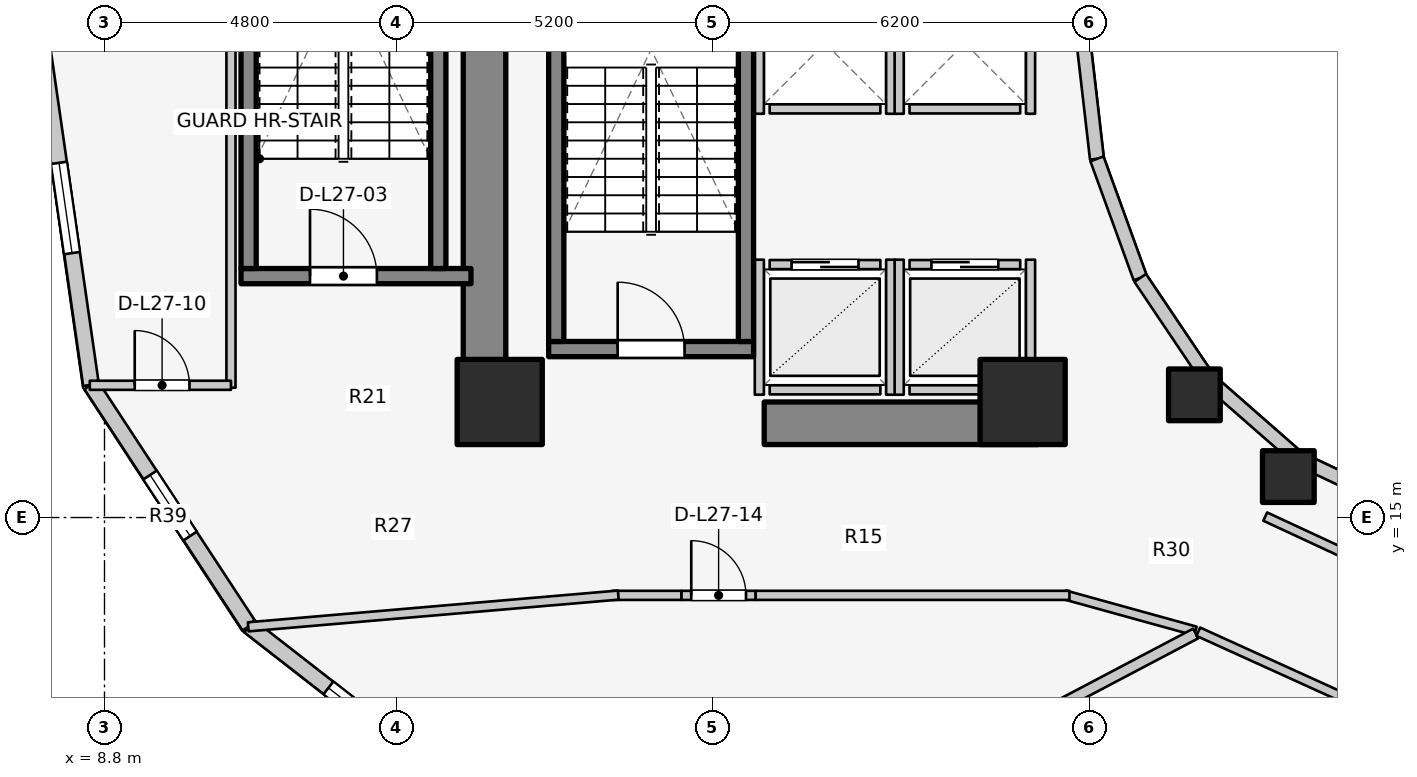
"""IFC4 building model, lengths in metres.
Left out: names, types, materials, properties, quantities, classifications, styles, units other than length and angle.
Written with IfcOpenShell. Run it as: python <this file> out.ifc"""

import sys

from ifc_helpers import new_model, si_unit, direction, frame, frame_2d, origin, origin_2d, place, context, subcontext, project, spatial, rectangle, extrude, element, fill, save


model = new_model("IFC4")
c1 = context("Model", 3, precision=1e-05, world=origin(), true_north=direction((0.0, 1.0)))
c2 = subcontext(c1, "Body", "Model", "MODEL_VIEW")
j1 = project(units=[si_unit("LENGTHUNIT", "METRE"), si_unit("PLANEANGLEUNIT", "RADIAN")], contexts=[c1])
p1 = place(None, origin())
s1 = spatial("IfcSite", under=j1, at=p1, CompositionType="ELEMENT")
p2 = place(p1, origin())
s2 = spatial("IfcBuilding", under=s1, at=p2, CompositionType="ELEMENT")
p3 = place(p2, frame((0.0, 0.0, 91.8)))
s3 = spatial("IfcBuildingStorey", under=s2, at=p3, CompositionType="ELEMENT", Elevation=91.8)
p4 = place(p3, frame((15.05, 17.05, 0.0), z_axis=(0.0, 0.0, 1.0), x_axis=(0.0, 1.0, 0.0)))
e1 = element("IfcWall", 1, at=p4, inside=s3, PredefinedType="SHEAR", context=c2, shape_type="SweptSolid", body=[
    extrude(rectangle(XDim=12.8, YDim=0.7, at=frame_2d((6.4, 0.0))), origin(), (0.0, 0.0, 1.0), 3.1),
])
p5 = place(p3, frame((19.65, 16.55, 0.0), z_axis=(0.0, 0.0, 1.0), x_axis=(1.0, 0.0, 0.0)))
e2 = element("IfcWall", 2, at=p5, inside=s3, PredefinedType="SHEAR", context=c2, shape_type="SweptSolid", body=[
    extrude(rectangle(XDim=4.5, YDim=0.7, at=frame_2d((2.25, 0.0))), origin(), (0.0, 0.0, 1.0), 3.1),
])
p6 = place(p3, frame((16.105, 17.77, 0.0), z_axis=(0.0, 0.0, 1.0), x_axis=(1.0, 0.0, 0.0)))
e3 = element("IfcWall", 3, at=p6, inside=s3, PredefinedType="SOLIDWALL", context=c2, shape_type="SweptSolid", body=[
    extrude(rectangle(XDim=3.37, YDim=0.25, at=frame_2d((1.685, 0.0))), origin(), (0.0, 0.0, 1.0), 3.1),
])
p7 = place(p6, frame((1.135, 0.0, 0.0)))
e4 = element("IfcOpeningElement", 4, at=p7, cuts=e3, PredefinedType="OPENING", context=c2, shape_type="SweptSolid", body=[
    extrude(rectangle(XDim=1.1, YDim=2.1, at=frame_2d((0.55, 1.05))), frame((0.0, 0.135, 0.0), z_axis=(0.0, -1.0, 0.0), x_axis=(1.0, 0.0, 0.0)), (0.0, 0.0, 1.0), 0.27),
])
for number, where, z_axis, x_axis in (
    (5, (16.23, 17.895, 0.0), (0.0, 0.0, 1.0), (0.0, 1.0, 0.0)),
    (6, (19.35, 17.895, 0.0), (0.0, 0.0, 1.0), (0.0, 1.0, 0.0)),
):
    element("IfcWall", number, at=place(p3, frame(where, z_axis=z_axis, x_axis=x_axis)), inside=s3, PredefinedType="SOLIDWALL", context=c2, shape_type="SweptSolid", body=[
        extrude(rectangle(XDim=7.81, YDim=0.25, at=frame_2d((3.905, 0.0))), origin(), (0.0, 0.0, 1.0), 3.1),
    ])
p8 = place(p3, frame((11.045, 18.97, 0.0), z_axis=(0.0, 0.0, 1.0), x_axis=(1.0, 0.0, 0.0)))
e7 = element("IfcWall", 7, at=p8, inside=s3, PredefinedType="SOLIDWALL", context=c2, shape_type="SweptSolid", body=[
    extrude(rectangle(XDim=3.782, YDim=0.25, at=frame_2d((1.891, 0.0))), origin(), (0.0, 0.0, 1.0), 3.1),
])
p9 = place(p8, frame((1.135, 0.0, 0.0)))
e8 = element("IfcOpeningElement", 8, at=p9, cuts=e7, PredefinedType="OPENING", context=c2, shape_type="SweptSolid", body=[
    extrude(rectangle(XDim=1.1, YDim=2.1, at=frame_2d((0.55, 1.05))), frame((0.0, 0.135, 0.0), z_axis=(0.0, -1.0, 0.0), x_axis=(1.0, 0.0, 0.0)), (0.0, 0.0, 1.0), 0.27),
])
for number, where, z_axis, x_axis in (
    (9, (11.17, 19.095, 0.0), (0.0, 0.0, 1.0), (0.0, 1.0, 0.0)),
    (10, (14.29, 19.095, 0.0), (0.0, 0.0, 1.0), (0.0, 1.0, 0.0)),
):
    element("IfcWall", number, at=place(p3, frame(where, z_axis=z_axis, x_axis=x_axis)), inside=s3, PredefinedType="SOLIDWALL", context=c2, shape_type="SweptSolid", body=[
        extrude(rectangle(XDim=7.81, YDim=0.25, at=frame_2d((3.905, 0.0))), origin(), (0.0, 0.0, 1.0), 3.1),
    ])
for number, where, z_axis, x_axis in (
    (11, (15.3, 16.9, 0.0), (0.0, 0.0, 1.0), (1.0, 0.0, 0.0)),
    (12, (23.9, 16.9, 0.0), (0.0, 0.0, 1.0), (1.0, 0.0, 0.0)),
):
    element("IfcColumn", number, at=place(p3, frame(where, z_axis=z_axis, x_axis=x_axis)), inside=s3, PredefinedType="COLUMN", context=c2, shape_type="SweptSolid", body=[
        extrude(rectangle(XDim=1.4, YDim=1.4, at=origin_2d()), origin(), (0.0, 0.0, 1.0), 3.1),
    ])
for number, where, z_axis, x_axis in (
    (13, (26.725, 17.018, 0.0), (0.0, 0.0, 1.0), (1.0, 0.0, 0.0)),
    (14, (28.27, 15.673, 0.0), (0.0, 0.0, 1.0), (1.0, 0.0, 0.0)),
):
    element("IfcColumn", number, at=place(p3, frame(where, z_axis=z_axis, x_axis=x_axis)), inside=s3, PredefinedType="COLUMN", context=c2, shape_type="SweptSolid", body=[
        extrude(rectangle(XDim=0.85, YDim=0.85, at=origin_2d()), origin(), (0.0, 0.0, 1.0), 3.1),
    ])
p10 = place(p3, frame((24.88, 23.0, 0.0), z_axis=(0.0, 0.0, 1.0), x_axis=(0.114711713601, -0.993398823617, 0.0)))
e15 = element("IfcWall", 15, at=p10, inside=s3, PredefinedType="STANDARD", context=c2, shape_type="SweptSolid", body=[
    extrude(rectangle(XDim=2.115, YDim=0.23, at=frame_2d((1.058, 0.0))), origin(), (0.0, 0.0, 1.0), 2.56),
])
p11 = place(p3, frame((25.123, 20.898, 0.0), z_axis=(0.0, 0.0, 1.0), x_axis=(0.341423187295, -0.93990968033, 0.0)))
e16 = element("IfcWall", 16, at=p11, inside=s3, PredefinedType="STANDARD", context=c2, shape_type="SweptSolid", body=[
    extrude(rectangle(XDim=2.084, YDim=0.23, at=frame_2d((1.042, 0.0))), origin(), (0.0, 0.0, 1.0), 2.56),
])
p12 = place(p3, frame((25.834, 18.94, 0.0), z_axis=(0.0, 0.0, 1.0), x_axis=(0.558197800898, -0.829707909492, 0.0)))
e17 = element("IfcWall", 17, at=p12, inside=s3, PredefinedType="STANDARD", context=c2, shape_type="SweptSolid", body=[
    extrude(rectangle(XDim=2.027, YDim=0.23, at=frame_2d((1.013, 0.0))), origin(), (0.0, 0.0, 1.0), 1.22),
])
p13 = place(p3, frame((26.965, 17.258, 0.0), z_axis=(0.0, 0.0, 1.0), x_axis=(0.752576694707, -0.658504607869, 0.0)))
e18 = element("IfcWall", 18, at=p13, inside=s3, PredefinedType="STANDARD", context=c2, shape_type="SweptSolid", body=[
    extrude(rectangle(XDim=1.959, YDim=0.23, at=frame_2d((0.98, 0.0))), origin(), (0.0, 0.0, 1.0), 1.22),
])
p14 = place(p3, frame((28.44, 15.968, 0.0), z_axis=(0.0, 0.0, 1.0), x_axis=(0.904179699603, -0.427152280606, 0.0)))
e19 = element("IfcWall", 19, at=p14, inside=s3, PredefinedType="STANDARD", context=c2, shape_type="SweptSolid", body=[
    extrude(rectangle(XDim=1.899, YDim=0.23, at=frame_2d((0.95, 0.0))), origin(), (0.0, 0.0, 1.0), 1.22),
])
p15 = place(p3, frame((7.74, 23.0, 0.0), z_axis=(0.0, 0.0, 1.0), x_axis=(0.142572472068, -0.98978436551, 0.0)))
e20 = element("IfcWall", 20, at=p15, inside=s3, PredefinedType="STANDARD", context=c2, shape_type="SweptSolid", body=[
    extrude(rectangle(XDim=5.879, YDim=0.26, at=frame_2d((2.939, 0.0))), origin(), (0.0, 0.0, 1.0), 2.57),
])
p16 = place(p15, frame((2.189, 0.0, 0.75)))
e21 = element("IfcOpeningElement", 21, at=p16, cuts=e20, PredefinedType="OPENING", context=c2, shape_type="SweptSolid", body=[
    extrude(rectangle(XDim=1.5, YDim=1.6, at=frame_2d((0.75, 0.8))), frame((0.0, 0.14, 0.0), z_axis=(0.0, -1.0, 0.0), x_axis=(1.0, 0.0, 0.0)), (0.0, 0.0, 1.0), 0.28),
])
p17 = place(p3, frame((8.578, 17.181, 0.0), z_axis=(0.0, 0.0, 1.0), x_axis=(0.548283220945, -0.836292717672, 0.0)))
e22 = element("IfcWall", 22, at=p17, inside=s3, PredefinedType="STANDARD", context=c2, shape_type="SweptSolid", body=[
    extrude(rectangle(XDim=4.744, YDim=0.26, at=frame_2d((2.372, 0.0))), origin(), (0.0, 0.0, 1.0), 1.22),
])
p18 = place(p17, frame((1.772, 0.0, 0.15)))
e23 = element("IfcOpeningElement", 23, at=p18, cuts=e22, PredefinedType="OPENING", context=c2, shape_type="SweptSolid", body=[
    extrude(rectangle(XDim=1.2, YDim=0.9, at=frame_2d((0.6, 0.45))), frame((0.0, 0.14, 0.0), z_axis=(0.0, -1.0, 0.0), x_axis=(1.0, 0.0, 0.0)), (0.0, 0.0, 1.0), 0.28),
])
p19 = place(p3, frame((11.179, 13.214, 0.0), z_axis=(0.0, 0.0, 1.0), x_axis=(0.789127449954, -0.614229491094, 0.0)))
e24 = element("IfcWall", 24, at=p19, inside=s3, PredefinedType="STANDARD", context=c2, shape_type="SweptSolid", body=[
    extrude(rectangle(XDim=4.505, YDim=0.26, at=frame_2d((2.252, 0.0))), origin(), (0.0, 0.0, 1.0), 1.22),
])
p20 = place(p19, frame((1.652, 0.0, 0.15)))
e25 = element("IfcOpeningElement", 25, at=p20, cuts=e24, PredefinedType="OPENING", context=c2, shape_type="SweptSolid", body=[
    extrude(rectangle(XDim=1.2, YDim=0.9, at=frame_2d((0.6, 0.45))), frame((0.0, 0.14, 0.0), z_axis=(0.0, -1.0, 0.0), x_axis=(1.0, 0.0, 0.0)), (0.0, 0.0, 1.0), 0.28),
])
p21 = place(p3, frame((19.74, 19.16, 0.0), z_axis=(0.0, 0.0, 1.0), x_axis=(1.0, 0.0, 0.0)))
e26 = element("IfcWall", 26, at=p21, inside=s3, PredefinedType="SOLIDWALL", context=c2, shape_type="SweptSolid", body=[
    extrude(rectangle(XDim=1.82, YDim=0.15, at=frame_2d((0.91, 0.0))), origin(), (0.0, 0.0, 1.0), 2.575),
])
p22 = place(p21, frame((0.36, 0.0, 0.0)))
e27 = element("IfcOpeningElement", 27, at=p22, cuts=e26, PredefinedType="OPENING", context=c2, shape_type="SweptSolid", body=[
    extrude(rectangle(XDim=1.1, YDim=2.1, at=frame_2d((0.55, 1.05))), frame((0.0, 0.085, 0.0), z_axis=(0.0, -1.0, 0.0), x_axis=(1.0, 0.0, 0.0)), (0.0, 0.0, 1.0), 0.17),
])
p23 = place(p3, frame((19.74, 17.1, 0.0), z_axis=(0.0, 0.0, 1.0), x_axis=(1.0, 0.0, 0.0)))
e28 = element("IfcWall", 28, at=p23, inside=s3, PredefinedType="SOLIDWALL", context=c2, shape_type="SweptSolid", body=[
    extrude(rectangle(XDim=1.82, YDim=0.15, at=frame_2d((0.91, 0.0))), origin(), (0.0, 0.0, 1.0), 2.575),
])
p24 = place(p3, frame((19.57, 17.02, 0.0), z_axis=(0.0, 0.0, 1.0), x_axis=(0.0, 1.0, 0.0)))
e29 = element("IfcWall", 29, at=p24, inside=s3, PredefinedType="SOLIDWALL", context=c2, shape_type="SweptSolid", body=[
    extrude(rectangle(XDim=2.22, YDim=0.15, at=frame_2d((1.11, 0.0))), origin(), (0.0, 0.0, 1.0), 2.12),
])
p25 = place(p3, frame((21.73, 17.02, 0.0), z_axis=(0.0, 0.0, 1.0), x_axis=(0.0, 1.0, 0.0)))
e30 = element("IfcWall", 30, at=p25, inside=s3, PredefinedType="SOLIDWALL", context=c2, shape_type="SweptSolid", body=[
    extrude(rectangle(XDim=2.22, YDim=0.15, at=frame_2d((1.11, 0.0))), origin(), (0.0, 0.0, 1.0), 2.575),
])
p26 = place(p3, frame((22.04, 19.16, 0.0), z_axis=(0.0, 0.0, 1.0), x_axis=(1.0, 0.0, 0.0)))
e31 = element("IfcWall", 31, at=p26, inside=s3, PredefinedType="SOLIDWALL", context=c2, shape_type="SweptSolid", body=[
    extrude(rectangle(XDim=1.82, YDim=0.15, at=frame_2d((0.91, 0.0))), origin(), (0.0, 0.0, 1.0), 2.12),
])
p27 = place(p26, frame((0.36, 0.0, 0.0)))
e32 = element("IfcOpeningElement", 32, at=p27, cuts=e31, PredefinedType="OPENING", context=c2, shape_type="SweptSolid", body=[
    extrude(rectangle(XDim=1.1, YDim=2.1, at=frame_2d((0.55, 1.05))), frame((0.0, 0.085, 0.0), z_axis=(0.0, -1.0, 0.0), x_axis=(1.0, 0.0, 0.0)), (0.0, 0.0, 1.0), 0.17),
])
p28 = place(p3, frame((22.04, 17.1, 0.0), z_axis=(0.0, 0.0, 1.0), x_axis=(1.0, 0.0, 0.0)))
e33 = element("IfcWall", 33, at=p28, inside=s3, PredefinedType="SOLIDWALL", context=c2, shape_type="SweptSolid", body=[
    extrude(rectangle(XDim=1.82, YDim=0.15, at=frame_2d((0.91, 0.0))), origin(), (0.0, 0.0, 1.0), 2.12),
])
p29 = place(p3, frame((21.87, 17.02, 0.0), z_axis=(0.0, 0.0, 1.0), x_axis=(0.0, 1.0, 0.0)))
e34 = element("IfcWall", 34, at=p29, inside=s3, PredefinedType="SOLIDWALL", context=c2, shape_type="SweptSolid", body=[
    extrude(rectangle(XDim=2.22, YDim=0.15, at=frame_2d((1.11, 0.0))), origin(), (0.0, 0.0, 1.0), 2.575),
])
p30 = place(p3, frame((24.03, 17.02, 0.0), z_axis=(0.0, 0.0, 1.0), x_axis=(0.0, 1.0, 0.0)))
e35 = element("IfcWall", 35, at=p30, inside=s3, PredefinedType="SOLIDWALL", context=c2, shape_type="SweptSolid", body=[
    extrude(rectangle(XDim=2.22, YDim=0.15, at=frame_2d((1.11, 0.0))), origin(), (0.0, 0.0, 1.0), 1.873),
])
p31 = place(p3, frame((19.74, 21.72, 0.0), z_axis=(0.0, 0.0, 1.0), x_axis=(1.0, 0.0, 0.0)))
e36 = element("IfcWall", 36, at=p31, inside=s3, PredefinedType="SOLIDWALL", context=c2, shape_type="SweptSolid", body=[
    extrude(rectangle(XDim=1.82, YDim=0.15, at=frame_2d((0.91, 0.0))), origin(), (0.0, 0.0, 1.0), 2.575),
])
for number, where, z_axis, x_axis in (
    (37, (19.57, 21.64, 0.0), (0.0, 0.0, 1.0), (0.0, 1.0, 0.0)),
    (38, (21.73, 21.64, 0.0), (0.0, 0.0, 1.0), (0.0, 1.0, 0.0)),
):
    element("IfcWall", number, at=place(p3, frame(where, z_axis=z_axis, x_axis=x_axis)), inside=s3, PredefinedType="SOLIDWALL", context=c2, shape_type="SweptSolid", body=[
        extrude(rectangle(XDim=2.32, YDim=0.15, at=frame_2d((1.16, 0.0))), origin(), (0.0, 0.0, 1.0), 2.575),
    ])
p32 = place(p3, frame((22.04, 21.72, 0.0), z_axis=(0.0, 0.0, 1.0), x_axis=(1.0, 0.0, 0.0)))
e39 = element("IfcWall", 39, at=p32, inside=s3, PredefinedType="SOLIDWALL", context=c2, shape_type="SweptSolid", body=[
    extrude(rectangle(XDim=1.82, YDim=0.15, at=frame_2d((0.91, 0.0))), origin(), (0.0, 0.0, 1.0), 2.12),
])
p33 = place(p3, frame((21.87, 21.64, 0.0), z_axis=(0.0, 0.0, 1.0), x_axis=(0.0, 1.0, 0.0)))
e40 = element("IfcWall", 40, at=p33, inside=s3, PredefinedType="SOLIDWALL", context=c2, shape_type="SweptSolid", body=[
    extrude(rectangle(XDim=2.32, YDim=0.15, at=frame_2d((1.16, 0.0))), origin(), (0.0, 0.0, 1.0), 2.575),
])
p34 = place(p3, frame((24.03, 21.64, 0.0), z_axis=(0.0, 0.0, 1.0), x_axis=(0.0, 1.0, 0.0)))
e41 = element("IfcWall", 41, at=p34, inside=s3, PredefinedType="SOLIDWALL", context=c2, shape_type="SweptSolid", body=[
    extrude(rectangle(XDim=2.32, YDim=0.15, at=frame_2d((1.16, 0.0))), origin(), (0.0, 0.0, 1.0), 2.12),
])
p35 = place(p3, frame((27.89, 15.015, 0.0), z_axis=(0.0, 0.0, 1.0), x_axis=(0.906943449489, -0.421252393975, 0.0)))
e42 = element("IfcWall", 42, at=p35, inside=s3, PredefinedType="PARTITIONING", context=c2, shape_type="SweptSolid", body=[
    extrude(rectangle(XDim=2.186, YDim=0.15, at=frame_2d((1.093, 0.0))), origin(), (0.0, 0.0, 1.0), 1.22),
])
p36 = place(p3, frame((10.88, 17.135, 0.0), z_axis=(0.0, 0.0, 1.0), x_axis=(0.0, 1.0, 0.0)))
e43 = element("IfcWall", 43, at=p36, inside=s3, PredefinedType="PARTITIONING", context=c2, shape_type="SweptSolid", body=[
    extrude(rectangle(XDim=11.73, YDim=0.15, at=frame_2d((5.865, 0.0))), origin(), (0.0, 0.0, 1.0), 2.12),
])
p37 = place(p3, frame((8.558, 17.175, 0.0), z_axis=(0.0, 0.0, 1.0), x_axis=(1.0, 0.0, 0.0)))
e44 = element("IfcWall", 44, at=p37, inside=s3, PredefinedType="PARTITIONING", context=c2, shape_type="SweptSolid", body=[
    extrude(rectangle(XDim=2.322, YDim=0.15, at=frame_2d((1.161, 0.0))), origin(), (0.0, 0.0, 1.0), 2.575),
])
p38 = place(p37, frame((0.739, 0.0, 0.0)))
e45 = element("IfcOpeningElement", 45, at=p38, cuts=e44, PredefinedType="OPENING", context=c2, shape_type="SweptSolid", body=[
    extrude(rectangle(XDim=0.9, YDim=2.1, at=frame_2d((0.45, 1.05))), frame((0.0, 0.085, 0.0), z_axis=(0.0, -1.0, 0.0), x_axis=(1.0, 0.0, 0.0)), (0.0, 0.0, 1.0), 0.17),
])
p39 = place(p3, frame((26.742, 13.133, 0.0), z_axis=(0.0, 0.0, 1.0), x_axis=(-0.963833843713, 0.266503886865, 0.0)))
e46 = element("IfcWall", 46, at=p39, inside=s3, PredefinedType="PARTITIONING", context=c2, shape_type="SweptSolid", body=[
    extrude(rectangle(XDim=2.232, YDim=0.15, at=frame_2d((1.116, 0.0))), origin(), (0.0, 0.0, 1.0), 1.22),
])
p40 = place(p3, frame((17.15, 13.72, 0.0), z_axis=(0.0, 0.0, 1.0), x_axis=(1.0, 0.0, 0.0)))
e47 = element("IfcWall", 47, at=p40, inside=s3, PredefinedType="PARTITIONING", context=c2, shape_type="SweptSolid", body=[
    extrude(rectangle(XDim=1.14, YDim=0.15, at=frame_2d((0.57, 0.0))), origin(), (0.0, 0.0, 1.0), 2.575),
])
p41 = place(p3, frame((18.29, 13.72, 0.0), z_axis=(0.0, 0.0, 1.0), x_axis=(1.0, 0.0, 0.0)))
e48 = element("IfcWall", 48, at=p41, inside=s3, PredefinedType="PARTITIONING", context=c2, shape_type="SweptSolid", body=[
    extrude(rectangle(XDim=1.22, YDim=0.15, at=frame_2d((0.61, 0.0))), origin(), (0.0, 0.0, 1.0), 2.16),
])
p42 = place(p41, frame((0.16, 0.0, 0.0)))
e49 = element("IfcOpeningElement", 49, at=p42, cuts=e48, PredefinedType="OPENING", context=c2, shape_type="SweptSolid", body=[
    extrude(rectangle(XDim=0.9, YDim=2.1, at=frame_2d((0.45, 1.05))), frame((0.0, 0.085, 0.0), z_axis=(0.0, -1.0, 0.0), x_axis=(1.0, 0.0, 0.0)), (0.0, 0.0, 1.0), 0.17),
])
p43 = place(p3, frame((19.51, 13.72, 0.0), z_axis=(0.0, 0.0, 1.0), x_axis=(1.0, 0.0, 0.0)))
e50 = element("IfcWall", 50, at=p43, inside=s3, PredefinedType="PARTITIONING", context=c2, shape_type="SweptSolid", body=[
    extrude(rectangle(XDim=5.16, YDim=0.15, at=frame_2d((2.58, 0.0))), origin(), (0.0, 0.0, 1.0), 1.22),
])
p44 = place(p3, frame((17.25, 13.724, 0.0), z_axis=(0.0, 0.0, 1.0), x_axis=(-0.996341886029, -0.085456691633, 0.0)))
e51 = element("IfcWall", 51, at=p44, inside=s3, PredefinedType="PARTITIONING", context=c2, shape_type="SweptSolid", body=[
    extrude(rectangle(XDim=6.108, YDim=0.15, at=frame_2d((3.054, 0.0))), origin(), (0.0, 0.0, 1.0), 1.22),
])
p45 = place(p3, frame((26.746, 13.093, 0.0), z_axis=(0.0, 0.0, 1.0), x_axis=(-0.884730147854, -0.466103599512, 0.0)))
e52 = element("IfcWall", 52, at=p45, inside=s3, PredefinedType="PARTITIONING", context=c2, shape_type="SweptSolid", body=[
    extrude(rectangle(XDim=8.31, YDim=0.18, at=frame_2d((4.155, 0.0))), origin(), (0.0, 0.0, 1.0), 1.22),
])
p46 = place(p3, frame((26.789, 13.123, 0.0), z_axis=(0.0, 0.0, 1.0), x_axis=(0.910568469686, -0.41335827319, 0.0)))
e53 = element("IfcWall", 53, at=p46, inside=s3, PredefinedType="PARTITIONING", context=c2, shape_type="SweptSolid", body=[
    extrude(rectangle(XDim=2.772, YDim=0.15, at=frame_2d((1.386, 0.0))), origin(), (0.0, 0.0, 1.0), 1.22),
])
p47 = place(p16, origin())
e54 = element("IfcWindow", 54, at=p47, inside=s3, PartitioningType="SINGLE_PANEL", PredefinedType="WINDOW", context=c2, shape_type="SweptSolid", body=[
    extrude(rectangle(XDim=1.5, YDim=1.6, at=frame_2d((0.75, 0.8))), frame((0.0, 0.03, 0.0), z_axis=(0.0, -1.0, 0.0), x_axis=(1.0, 0.0, 0.0)), (0.0, 0.0, 1.0), 0.06),
])
fill(e21, e54)
p48 = place(p18, origin())
e55 = element("IfcWindow", 55, at=p48, inside=s3, PartitioningType="SINGLE_PANEL", PredefinedType="WINDOW", context=c2, shape_type="SweptSolid", body=[
    extrude(rectangle(XDim=1.2, YDim=0.9, at=frame_2d((0.6, 0.45))), frame((0.0, 0.03, 0.0), z_axis=(0.0, -1.0, 0.0), x_axis=(1.0, 0.0, 0.0)), (0.0, 0.0, 1.0), 0.06),
])
fill(e23, e55)
p49 = place(p20, origin())
e56 = element("IfcWindow", 56, at=p49, inside=s3, PartitioningType="SINGLE_PANEL", PredefinedType="WINDOW", context=c2, shape_type="SweptSolid", body=[
    extrude(rectangle(XDim=1.2, YDim=0.9, at=frame_2d((0.6, 0.45))), frame((0.0, 0.03, 0.0), z_axis=(0.0, -1.0, 0.0), x_axis=(1.0, 0.0, 0.0)), (0.0, 0.0, 1.0), 0.06),
])
fill(e25, e56)
p50 = place(p7, origin())
e57 = element("IfcDoor", 57, at=p50, inside=s3, OperationType="SINGLE_SWING_LEFT", PredefinedType="DOOR", context=c2, shape_type="SweptSolid", body=[
    extrude(rectangle(XDim=1.1, YDim=2.1, at=frame_2d((0.55, 1.05))), frame((0.0, 0.025, 0.0), z_axis=(0.0, -1.0, 0.0), x_axis=(1.0, 0.0, 0.0)), (0.0, 0.0, 1.0), 0.05),
])
fill(e4, e57)
p51 = place(p9, origin())
e58 = element("IfcDoor", 58, at=p51, inside=s3, OperationType="SINGLE_SWING_LEFT", PredefinedType="DOOR", context=c2, shape_type="SweptSolid", body=[
    extrude(rectangle(XDim=1.1, YDim=2.1, at=frame_2d((0.55, 1.05))), frame((0.0, 0.025, 0.0), z_axis=(0.0, -1.0, 0.0), x_axis=(1.0, 0.0, 0.0)), (0.0, 0.0, 1.0), 0.05),
])
fill(e8, e58)
p52 = place(p22, origin())
e59 = element("IfcDoor", 59, at=p52, inside=s3, OperationType="DOUBLE_DOOR_SLIDING", PredefinedType="DOOR", context=c2, shape_type="SweptSolid", body=[
    extrude(rectangle(XDim=1.1, YDim=2.1, at=frame_2d((0.55, 1.05))), frame((0.0, 0.025, 0.0), z_axis=(0.0, -1.0, 0.0), x_axis=(1.0, 0.0, 0.0)), (0.0, 0.0, 1.0), 0.05),
])
fill(e27, e59)
p53 = place(p27, origin())
e60 = element("IfcDoor", 60, at=p53, inside=s3, OperationType="DOUBLE_DOOR_SLIDING", PredefinedType="DOOR", context=c2, shape_type="SweptSolid", body=[
    extrude(rectangle(XDim=1.1, YDim=2.1, at=frame_2d((0.55, 1.05))), frame((0.0, 0.025, 0.0), z_axis=(0.0, -1.0, 0.0), x_axis=(1.0, 0.0, 0.0)), (0.0, 0.0, 1.0), 0.05),
])
fill(e32, e60)
p54 = place(p38, origin())
e61 = element("IfcDoor", 61, at=p54, inside=s3, OperationType="SINGLE_SWING_LEFT", PredefinedType="DOOR", context=c2, shape_type="SweptSolid", body=[
    extrude(rectangle(XDim=0.9, YDim=2.1, at=frame_2d((0.45, 1.05))), frame((0.0, 0.025, 0.0), z_axis=(0.0, -1.0, 0.0), x_axis=(1.0, 0.0, 0.0)), (0.0, 0.0, 1.0), 0.05),
])
fill(e45, e61)
p55 = place(p42, origin())
e62 = element("IfcDoor", 62, at=p55, inside=s3, OperationType="SINGLE_SWING_LEFT", PredefinedType="DOOR", context=c2, shape_type="SweptSolid", body=[
    extrude(rectangle(XDim=0.9, YDim=2.1, at=frame_2d((0.45, 1.05))), frame((0.0, 0.025, 0.0), z_axis=(0.0, -1.0, 0.0), x_axis=(1.0, 0.0, 0.0)), (0.0, 0.0, 1.0), 0.05),
])
fill(e49, e62)
save(model, sys.argv[1])
